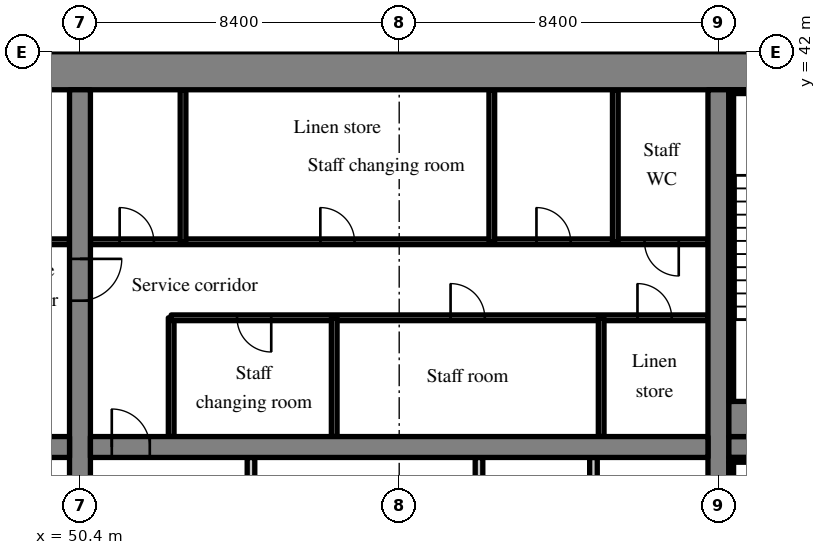
"""IFC4 building model, lengths in metres.
Left out: names, types, materials, properties, quantities, classifications, styles, units other than length and angle.
Written with IfcOpenShell. Run it as: python <this file> out.ifc"""

import sys

from ifc_helpers import new_model, si_unit, direction, frame, frame_2d, origin, place, context, subcontext, project, spatial, rectangle, extrude, source, transform, mapped, element, fill, save


model = new_model("IFC4")
c1 = context("Model", 3, precision=1e-05, world=origin(), true_north=direction((0.0, 1.0)))
c2 = subcontext(c1, "Body", "Model", "MODEL_VIEW")
j1 = project(units=[si_unit("LENGTHUNIT", "METRE"), si_unit("PLANEANGLEUNIT", "RADIAN")], contexts=[c1])
p1 = place(None, origin())
s1 = spatial("IfcSite", under=j1, at=p1, CompositionType="ELEMENT")
p2 = place(p1, origin())
s2 = spatial("IfcBuilding", under=s1, at=p2, CompositionType="ELEMENT")
p3 = place(p2, frame((0.0, 0.0, 65.8)))
s3 = spatial("IfcBuildingStorey", under=s2, at=p3, CompositionType="ELEMENT", Elevation=65.8)
m1 = source(origin(), c2, "Body", "SweptSolid", [
    extrude(rectangle(XDim=50.4, YDim=1.0, at=frame_2d((25.2, 0.0))), origin(), (0.0, 0.0, 1.0), 3.52),
])
p4 = place(p3, frame((25.2, 41.5, 0.0), z_axis=(0.0, 0.0, 1.0), x_axis=(1.0, 0.0, 0.0)))
e1 = element("IfcWall", 1, at=p4, inside=s3, PredefinedType="SHEAR", context=c2, shape_type="MappedRepresentation", body=[
    mapped(m1, transform((0.0, 0.0, 0.0), scale=1.0)),
])
m2 = source(origin(), c2, "Body", "SweptSolid", [
    extrude(rectangle(XDim=18.0, YDim=0.55, at=frame_2d((9.0, 0.0))), origin(), (0.0, 0.0, 1.0), 3.52),
])
p5 = place(p3, frame((50.4, 23.0, 0.0), z_axis=(0.0, 0.0, 1.0), x_axis=(0.0, 1.0, 0.0)))
e2 = element("IfcWall", 2, at=p5, inside=s3, PredefinedType="SHEAR", context=c2, shape_type="MappedRepresentation", body=[
    mapped(m2, transform((0.0, 0.0, 0.0), scale=1.0)),
])
m3 = source(origin(), c2, "Body", "SweptSolid", [
    extrude(rectangle(XDim=1.1, YDim=2.1, at=frame_2d((0.55, 1.05))), frame((0.0, 0.285, 0.0), z_axis=(0.0, -1.0, 0.0), x_axis=(1.0, 0.0, 0.0)), (0.0, 0.0, 1.0), 0.57),
])
p6 = place(p5, frame((12.45, 0.0, 0.0)))
e3 = element("IfcOpeningElement", 3, at=p6, cuts=e2, PredefinedType="OPENING", context=c2, shape_type="MappedRepresentation", body=[
    mapped(m3, transform((0.0, 0.0, 0.0), scale=1.0)),
])
p7 = place(p3, frame((67.2, 23.0, 0.0), z_axis=(0.0, 0.0, 1.0), x_axis=(0.0, 1.0, 0.0)))
e4 = element("IfcWall", 4, at=p7, inside=s3, PredefinedType="SHEAR", context=c2, shape_type="MappedRepresentation", body=[
    mapped(m2, transform((0.0, 0.0, 0.0), scale=1.0)),
])
m4 = source(origin(), c2, "Body", "SweptSolid", [
    extrude(rectangle(XDim=16.25, YDim=0.55, at=frame_2d((8.125, 0.0))), origin(), (0.0, 0.0, 1.0), 3.52),
])
p8 = place(p3, frame((33.875, 31.6, 0.0), z_axis=(0.0, 0.0, 1.0), x_axis=(1.0, 0.0, 0.0)))
e5 = element("IfcWall", 5, at=p8, inside=s3, PredefinedType="SHEAR", context=c2, shape_type="MappedRepresentation", body=[
    mapped(m4, transform((0.0, 0.0, 0.0), scale=1.0)),
])
m5 = source(origin(), c2, "Body", "SweptSolid", [
    extrude(rectangle(XDim=1.0, YDim=2.1, at=frame_2d((0.5, 1.05))), frame((0.0, 0.285, 0.0), z_axis=(0.0, -1.0, 0.0), x_axis=(1.0, 0.0, 0.0)), (0.0, 0.0, 1.0), 0.57),
])
p9 = place(p8, frame((14.687, 0.0, 0.0)))
e6 = element("IfcOpeningElement", 6, at=p9, cuts=e5, PredefinedType="OPENING", context=c2, shape_type="MappedRepresentation", body=[
    mapped(m5, transform((0.0, 0.0, 0.0), scale=1.0)),
])
p10 = place(p3, frame((50.675, 31.6, 0.0), z_axis=(0.0, 0.0, 1.0), x_axis=(1.0, 0.0, 0.0)))
e7 = element("IfcWall", 7, at=p10, inside=s3, PredefinedType="SHEAR", context=c2, shape_type="MappedRepresentation", body=[
    mapped(m4, transform((0.0, 0.0, 0.0), scale=1.0)),
])
p11 = place(p10, frame((0.562, 0.0, 0.0)))
e8 = element("IfcOpeningElement", 8, at=p11, cuts=e7, PredefinedType="OPENING", context=c2, shape_type="MappedRepresentation", body=[
    mapped(m5, transform((0.0, 0.0, 0.0), scale=1.0)),
])
m6 = source(origin(), c2, "Body", "SweptSolid", [
    extrude(rectangle(XDim=7.125, YDim=0.55, at=frame_2d((3.562, 0.0))), origin(), (0.0, 0.0, 1.0), 3.52),
])
p12 = place(p3, frame((67.475, 31.6, 0.0), z_axis=(0.0, 0.0, 1.0), x_axis=(1.0, 0.0, 0.0)))
e9 = element("IfcWall", 9, at=p12, inside=s3, PredefinedType="SHEAR", context=c2, shape_type="MappedRepresentation", body=[
    mapped(m6, transform((0.0, 0.0, 0.0), scale=1.0)),
])
p13 = place(p12, frame((5.5, 0.0, 0.0)))
e10 = element("IfcOpeningElement", 10, at=p13, cuts=e9, PredefinedType="OPENING", context=c2, shape_type="MappedRepresentation", body=[
    mapped(m3, transform((0.0, 0.0, 0.0), scale=1.0)),
])
m7 = source(origin(), c2, "Body", "SweptSolid", [
    extrude(rectangle(XDim=16.25, YDim=0.15, at=frame_2d((8.125, 0.0))), origin(), (0.0, 0.0, 1.0), 3.52),
])
p14 = place(p3, frame((33.875, 37.0, 0.0), z_axis=(0.0, 0.0, 1.0), x_axis=(1.0, 0.0, 0.0)))
e11 = element("IfcWall", 11, at=p14, inside=s3, PredefinedType="PARTITIONING", context=c2, shape_type="MappedRepresentation", body=[
    mapped(m7, transform((0.0, 0.0, 0.0), scale=1.0)),
])
m8 = source(origin(), c2, "Body", "SweptSolid", [
    extrude(rectangle(XDim=0.9, YDim=2.1, at=frame_2d((0.45, 1.05))), frame((0.0, 0.085, 0.0), z_axis=(0.0, -1.0, 0.0), x_axis=(1.0, 0.0, 0.0)), (0.0, 0.0, 1.0), 0.17),
])
p15 = place(p14, frame((3.206, 0.0, 0.0)))
e12 = element("IfcOpeningElement", 12, at=p15, cuts=e11, PredefinedType="OPENING", context=c2, shape_type="MappedRepresentation", body=[
    mapped(m8, transform((0.0, 0.0, 0.0), scale=1.0)),
])
p16 = place(p14, frame((8.081, 0.0, 0.0)))
e13 = element("IfcOpeningElement", 13, at=p16, cuts=e11, PredefinedType="OPENING", context=c2, shape_type="MappedRepresentation", body=[
    mapped(m8, transform((0.0, 0.0, 0.0), scale=1.0)),
])
p17 = place(p14, frame((11.331, 0.0, 0.0)))
e14 = element("IfcOpeningElement", 14, at=p17, cuts=e11, PredefinedType="OPENING", context=c2, shape_type="MappedRepresentation", body=[
    mapped(m8, transform((0.0, 0.0, 0.0), scale=1.0)),
])
p18 = place(p14, frame((14.581, 0.0, 0.0)))
e15 = element("IfcOpeningElement", 15, at=p18, cuts=e11, PredefinedType="OPENING", context=c2, shape_type="MappedRepresentation", body=[
    mapped(m8, transform((0.0, 0.0, 0.0), scale=1.0)),
])
m9 = source(origin(), c2, "Body", "SweptSolid", [
    extrude(rectangle(XDim=8.325, YDim=0.2, at=frame_2d((4.163, 0.0))), origin(), (0.0, 0.0, 1.0), 3.52),
])
for number, where, z_axis, x_axis in (
    (16, (54.9, 23.0, 0.0), (0.0, 0.0, 1.0), (0.0, 1.0, 0.0)),
    (17, (60.9, 23.0, 0.0), (0.0, 0.0, 1.0), (0.0, 1.0, 0.0)),
    (18, (63.912, 23.0, 0.0), (0.0, 0.0, 1.0), (0.0, 1.0, 0.0)),
):
    element("IfcWall", number, at=place(p3, frame(where, z_axis=z_axis, x_axis=x_axis)), inside=s3, PredefinedType="PARTITIONING", context=c2, shape_type="MappedRepresentation", body=[
        mapped(m9, transform((0.0, 0.0, 0.0), scale=1.0)),
    ])
m10 = source(origin(), c2, "Body", "SweptSolid", [
    extrude(rectangle(XDim=3.125, YDim=0.15, at=frame_2d((1.562, 0.0))), origin(), (0.0, 0.0, 1.0), 3.52),
])
p19 = place(p3, frame((52.8, 31.875, 0.0), z_axis=(0.0, 0.0, 1.0), x_axis=(0.0, 1.0, 0.0)))
e19 = element("IfcWall", 19, at=p19, inside=s3, PredefinedType="PARTITIONING", context=c2, shape_type="MappedRepresentation", body=[
    mapped(m10, transform((0.0, 0.0, 0.0), scale=1.0)),
])
m11 = source(origin(), c2, "Body", "SweptSolid", [
    extrude(rectangle(XDim=14.125, YDim=0.15, at=frame_2d((7.062, 0.0))), origin(), (0.0, 0.0, 1.0), 3.52),
])
p20 = place(p3, frame((66.925, 35.0, 0.0), z_axis=(0.0, 0.0, 1.0), x_axis=(-1.0, 0.0, 0.0)))
e20 = element("IfcWall", 20, at=p20, inside=s3, PredefinedType="PARTITIONING", context=c2, shape_type="MappedRepresentation", body=[
    mapped(m11, transform((0.0, 0.0, 0.0), scale=1.0)),
])
p21 = place(p20, frame((0.955, 0.0, 0.0)))
e21 = element("IfcOpeningElement", 21, at=p21, cuts=e20, PredefinedType="OPENING", context=c2, shape_type="MappedRepresentation", body=[
    mapped(m8, transform((0.0, 0.0, 0.0), scale=1.0)),
])
p22 = place(p20, frame((5.873, 0.0, 0.0)))
e22 = element("IfcOpeningElement", 22, at=p22, cuts=e20, PredefinedType="OPENING", context=c2, shape_type="MappedRepresentation", body=[
    mapped(m8, transform((0.0, 0.0, 0.0), scale=1.0)),
])
p23 = place(p20, frame((11.492, 0.0, 0.0)))
e23 = element("IfcOpeningElement", 23, at=p23, cuts=e20, PredefinedType="OPENING", context=c2, shape_type="MappedRepresentation", body=[
    mapped(m8, transform((0.0, 0.0, 0.0), scale=1.0)),
])
p24 = place(p3, frame((66.925, 37.0, 0.0), z_axis=(0.0, 0.0, 1.0), x_axis=(-1.0, 0.0, 0.0)))
e24 = element("IfcWall", 24, at=p24, inside=s3, PredefinedType="PARTITIONING", context=c2, shape_type="MappedRepresentation", body=[
    mapped(m7, transform((0.0, 0.0, 0.0), scale=1.0)),
])
p25 = place(p24, frame((0.769, 0.0, 0.0)))
e25 = element("IfcOpeningElement", 25, at=p25, cuts=e24, PredefinedType="OPENING", context=c2, shape_type="MappedRepresentation", body=[
    mapped(m8, transform((0.0, 0.0, 0.0), scale=1.0)),
])
p26 = place(p24, frame((3.613, 0.0, 0.0)))
e26 = element("IfcOpeningElement", 26, at=p26, cuts=e24, PredefinedType="OPENING", context=c2, shape_type="MappedRepresentation", body=[
    mapped(m8, transform((0.0, 0.0, 0.0), scale=1.0)),
])
p27 = place(p24, frame((9.3, 0.0, 0.0)))
e27 = element("IfcOpeningElement", 27, at=p27, cuts=e24, PredefinedType="OPENING", context=c2, shape_type="MappedRepresentation", body=[
    mapped(m8, transform((0.0, 0.0, 0.0), scale=1.0)),
])
p28 = place(p24, frame((14.581, 0.0, 0.0)))
e28 = element("IfcOpeningElement", 28, at=p28, cuts=e24, PredefinedType="OPENING", context=c2, shape_type="MappedRepresentation", body=[
    mapped(m8, transform((0.0, 0.0, 0.0), scale=1.0)),
])
for number, where, z_axis, x_axis in (
    (29, (64.115, 31.875, 0.0), (0.0, 0.0, 1.0), (0.0, 1.0, 0.0)),
    (30, (57.09, 31.875, 0.0), (0.0, 0.0, 1.0), (0.0, 1.0, 0.0)),
):
    element("IfcWall", number, at=place(p3, frame(where, z_axis=z_axis, x_axis=x_axis)), inside=s3, PredefinedType="PARTITIONING", context=c2, shape_type="MappedRepresentation", body=[
        mapped(m10, transform((0.0, 0.0, 0.0), scale=1.0)),
    ])
m12 = source(origin(), c2, "Body", "SweptSolid", [
    extrude(rectangle(XDim=4.0, YDim=0.15, at=frame_2d((2.0, 0.0))), origin(), (0.0, 0.0, 1.0), 3.52),
])
for number, where, z_axis, x_axis in (
    (31, (64.487, 37.0, 0.0), (0.0, 0.0, 1.0), (0.0, 1.0, 0.0)),
    (32, (61.237, 37.0, 0.0), (0.0, 0.0, 1.0), (0.0, 1.0, 0.0)),
    (33, (53.112, 37.0, 0.0), (0.0, 0.0, 1.0), (0.0, 1.0, 0.0)),
):
    element("IfcWall", number, at=place(p3, frame(where, z_axis=z_axis, x_axis=x_axis)), inside=s3, PredefinedType="PARTITIONING", context=c2, shape_type="MappedRepresentation", body=[
        mapped(m12, transform((0.0, 0.0, 0.0), scale=1.0)),
    ])
m13 = source(origin(), c2, "Body", "SweptSolid", [
    extrude(rectangle(XDim=4.775, YDim=0.125, at=frame_2d((2.387, 0.0))), origin(), (0.0, 0.0, 1.0), 3.52),
])
p29 = place(p3, frame((67.475, 31.262, 0.0), z_axis=(0.0, 0.0, 1.0), x_axis=(1.0, 0.0, 0.0)))
e34 = element("IfcWall", 34, at=p29, inside=s3, PredefinedType="SOLIDWALL", context=c2, shape_type="MappedRepresentation", body=[
    mapped(m13, transform((0.0, 0.0, 0.0), scale=1.0)),
])
m14 = source(origin(), c2, "Body", "SweptSolid", [
    extrude(rectangle(XDim=8.1, YDim=0.125, at=frame_2d((4.05, 0.0))), origin(), (0.0, 0.0, 1.0), 3.52),
])
p30 = place(p3, frame((67.537, 23.1, 0.0), z_axis=(0.0, 0.0, 1.0), x_axis=(0.0, 1.0, 0.0)))
e35 = element("IfcWall", 35, at=p30, inside=s3, PredefinedType="SOLIDWALL", context=c2, shape_type="MappedRepresentation", body=[
    mapped(m14, transform((0.0, 0.0, 0.0), scale=1.0)),
])
m15 = source(origin(), c2, "Body", "SweptSolid", [
    extrude(rectangle(XDim=4.775, YDim=0.1, at=frame_2d((2.387, 0.0))), origin(), (0.0, 0.0, 1.0), 3.52),
])
p31 = place(p3, frame((67.475, 40.95, 0.0), z_axis=(0.0, 0.0, 1.0), x_axis=(1.0, 0.0, 0.0)))
e36 = element("IfcWall", 36, at=p31, inside=s3, PredefinedType="SOLIDWALL", context=c2, shape_type="MappedRepresentation", body=[
    mapped(m15, transform((0.0, 0.0, 0.0), scale=1.0)),
])
m16 = source(origin(), c2, "Body", "SweptSolid", [
    extrude(rectangle(XDim=4.775, YDim=0.925, at=frame_2d((2.387, 0.0))), origin(), (0.0, 0.0, 1.0), 3.52),
])
p32 = place(p3, frame((67.475, 32.337, 0.0), z_axis=(0.0, 0.0, 1.0), x_axis=(1.0, 0.0, 0.0)))
e37 = element("IfcWall", 37, at=p32, inside=s3, PredefinedType="SOLIDWALL", context=c2, shape_type="MappedRepresentation", body=[
    mapped(m16, transform((0.0, 0.0, 0.0), scale=1.0)),
])
p33 = place(p3, frame((67.537, 32.8, 0.0), z_axis=(0.0, 0.0, 1.0), x_axis=(0.0, 1.0, 0.0)))
e38 = element("IfcWall", 38, at=p33, inside=s3, PredefinedType="SOLIDWALL", context=c2, shape_type="MappedRepresentation", body=[
    mapped(m14, transform((0.0, 0.0, 0.0), scale=1.0)),
])
m17 = source(origin(), c2, "Body", "SweptSolid", [
    extrude(rectangle(XDim=1.0, YDim=2.1, at=frame_2d((0.5, 1.05))), frame((0.0, 0.025, 0.0), z_axis=(0.0, -1.0, 0.0), x_axis=(1.0, 0.0, 0.0)), (0.0, 0.0, 1.0), 0.05),
])
p34 = place(p11, origin())
e39 = element("IfcDoor", 39, at=p34, inside=s3, OperationType="SINGLE_SWING_LEFT", PredefinedType="DOOR", context=c2, shape_type="MappedRepresentation", body=[
    mapped(m17, transform((0.0, 0.0, 0.0), scale=1.0)),
])
fill(e8, e39)
m18 = source(origin(), c2, "Body", "SweptSolid", [
    extrude(rectangle(XDim=0.9, YDim=2.1, at=frame_2d((0.45, 1.05))), frame((0.0, 0.025, 0.0), z_axis=(0.0, -1.0, 0.0), x_axis=(1.0, 0.0, 0.0)), (0.0, 0.0, 1.0), 0.05),
])
p35 = place(p21, origin())
e40 = element("IfcDoor", 40, at=p35, inside=s3, OperationType="SINGLE_SWING_RIGHT", PredefinedType="DOOR", context=c2, shape_type="MappedRepresentation", body=[
    mapped(m18, transform((0.0, 0.0, 0.0), scale=1.0)),
])
fill(e21, e40)
p36 = place(p22, origin())
e41 = element("IfcDoor", 41, at=p36, inside=s3, OperationType="SINGLE_SWING_RIGHT", PredefinedType="DOOR", context=c2, shape_type="MappedRepresentation", body=[
    mapped(m18, transform((0.0, 0.0, 0.0), scale=1.0)),
])
fill(e22, e41)
p37 = place(p23, origin())
e42 = element("IfcDoor", 42, at=p37, inside=s3, OperationType="SINGLE_SWING_LEFT", PredefinedType="DOOR", context=c2, shape_type="MappedRepresentation", body=[
    mapped(m18, transform((0.0, 0.0, 0.0), scale=1.0)),
])
fill(e23, e42)
p38 = place(p25, origin())
e43 = element("IfcDoor", 43, at=p38, inside=s3, OperationType="SINGLE_SWING_LEFT", PredefinedType="DOOR", context=c2, shape_type="MappedRepresentation", body=[
    mapped(m18, transform((0.0, 0.0, 0.0), scale=1.0)),
])
fill(e25, e43)
p39 = place(p26, origin())
e44 = element("IfcDoor", 44, at=p39, inside=s3, OperationType="SINGLE_SWING_RIGHT", PredefinedType="DOOR", context=c2, shape_type="MappedRepresentation", body=[
    mapped(m18, transform((0.0, 0.0, 0.0), scale=1.0)),
])
fill(e26, e44)
p40 = place(p27, origin())
e45 = element("IfcDoor", 45, at=p40, inside=s3, OperationType="SINGLE_SWING_RIGHT", PredefinedType="DOOR", context=c2, shape_type="MappedRepresentation", body=[
    mapped(m18, transform((0.0, 0.0, 0.0), scale=1.0)),
])
fill(e27, e45)
p41 = place(p28, origin())
e46 = element("IfcDoor", 46, at=p41, inside=s3, OperationType="SINGLE_SWING_RIGHT", PredefinedType="DOOR", context=c2, shape_type="MappedRepresentation", body=[
    mapped(m18, transform((0.0, 0.0, 0.0), scale=1.0)),
])
fill(e28, e46)
m19 = source(origin(), c2, "Body", "SweptSolid", [
    extrude(rectangle(XDim=1.1, YDim=2.1, at=frame_2d((0.55, 1.05))), frame((0.0, 0.025, 0.0), z_axis=(0.0, -1.0, 0.0), x_axis=(1.0, 0.0, 0.0)), (0.0, 0.0, 1.0), 0.05),
])
p42 = place(p6, origin())
e47 = element("IfcDoor", 47, at=p42, inside=s3, OperationType="SINGLE_SWING_RIGHT", PredefinedType="DOOR", context=c2, shape_type="MappedRepresentation", body=[
    mapped(m19, transform((0.0, 0.0, 0.0), scale=1.0)),
])
fill(e3, e47)
save(model, sys.argv[1])
